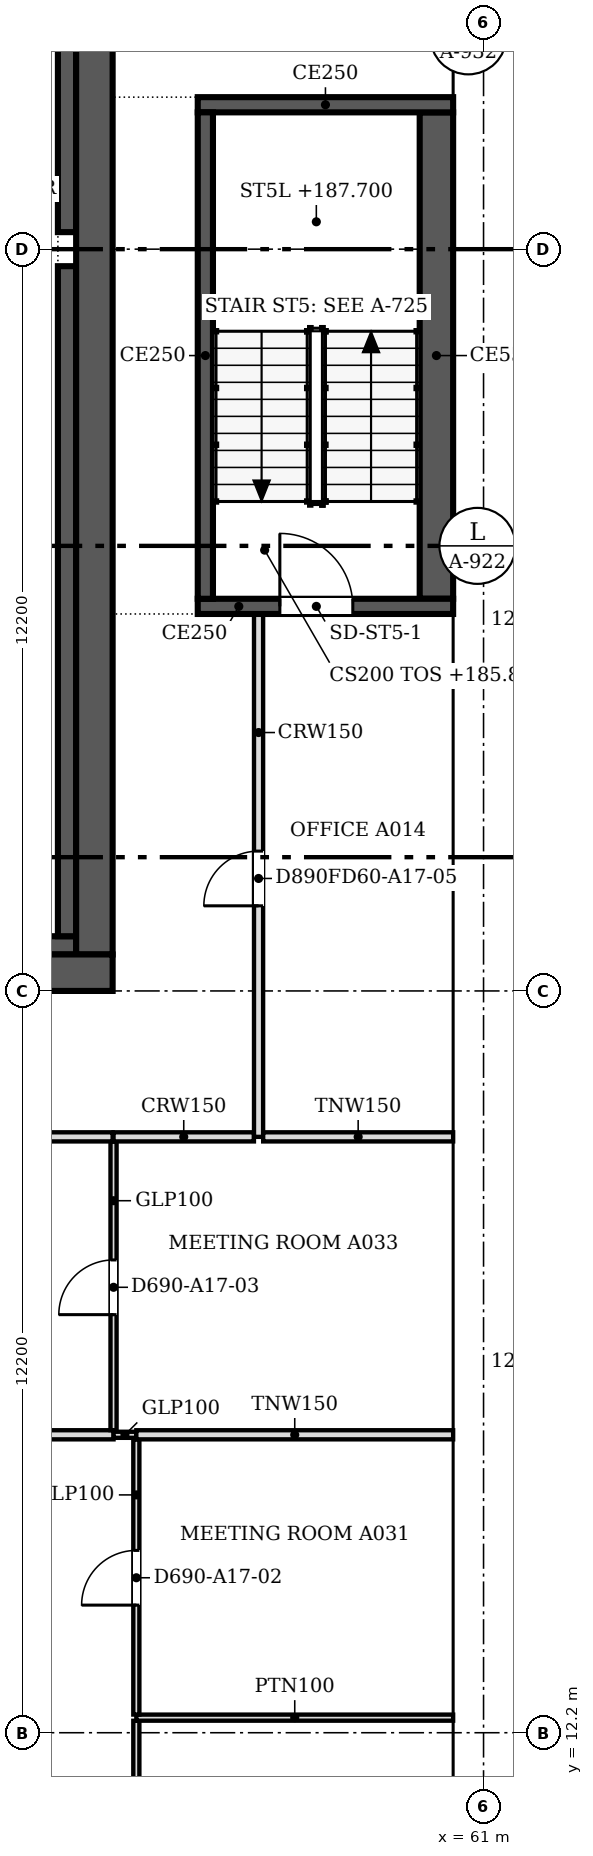
"""IFC4 building model, lengths in metres.
Left out: names, types, materials, properties, quantities, classifications, styles, units other than length and angle.
Written with IfcOpenShell. Run it as: python <this file> out.ifc"""

import sys

from ifc_helpers import new_model, si_unit, direction, frame, frame_2d, origin, place, context, subcontext, project, spatial, polyline, rectangle, outline, extrude, faceted_brep, source, transform, mapped, element, fill, save


model = new_model("IFC4")
c1 = context("Model", 3, precision=1e-05, world=origin(), true_north=direction((0.0, 1.0)))
c2 = subcontext(c1, "Body", "Model", "MODEL_VIEW")
j1 = project(units=[si_unit("LENGTHUNIT", "METRE"), si_unit("PLANEANGLEUNIT", "RADIAN")], contexts=[c1])
p1 = place(None, origin())
s1 = spatial("IfcSite", under=j1, at=p1, CompositionType="ELEMENT")
p2 = place(p1, origin())
s2 = spatial("IfcBuilding", under=s1, at=p2, CompositionType="ELEMENT")
p3 = place(p2, frame((0.0, 0.0, 185.8)))
s3 = spatial("IfcBuildingStorey", under=s2, at=p3, CompositionType="ELEMENT", Elevation=185.8)
m1 = source(origin(), c2, "Body", "Brep", [
    faceted_brep([(3.003, -0.25, 0.0), (6.053, -0.25, 3.8), (3.003, -0.25, 7.6), (0.0, -0.25, 3.8), (0.047, 0.25, 3.859), (3.003, 0.25, 7.6), (6.053, 0.25, 3.8), (3.003, 0.25, 0.0), (0.047, 0.25, 3.741), (0.0, 0.0, 3.8)], [[[0, 1, 2, 3]], [[4, 5, 6, 7, 8]], [[7, 6, 1, 0]], [[6, 5, 2, 1]], [[5, 4, 9, 3, 2]], [[8, 7, 0, 3, 9]], [[8, 9, 4]]]),
])
p4 = place(p3, frame((60.75, 6.146, -3.8), z_axis=(0.0, 0.0, 1.0), x_axis=(0.0, 1.0, 0.0)))
e1 = element("IfcWall", 1, at=p4, inside=s3, PredefinedType="SOLIDWALL", context=c2, shape_type="MappedRepresentation", body=[
    mapped(m1, transform((0.0, 0.0, 0.0), scale=1.0)),
])
m2 = source(origin(), c2, "Body", "SweptSolid", [
    extrude(outline(polyline([(3.005, 0.401), (5.733, 3.8), (3.005, 7.199), (0.319, 3.8), (3.005, 0.401)])), frame((0.0, 0.26, 0.0), z_axis=(0.0, -1.0, 0.0), x_axis=(1.0, 0.0, 0.0)), (0.0, 0.0, 1.0), 0.52),
])
p5 = place(p4, origin())
e2 = element("IfcOpeningElement", 2, at=p5, cuts=e1, PredefinedType="OPENING", context=c2, shape_type="MappedRepresentation", body=[
    mapped(m2, transform((0.0, 0.0, 0.0), scale=1.0)),
])
m3 = source(origin(), c2, "Body", "SweptSolid", [
    extrude(outline(polyline([(3.05, 0.0), (6.1, 3.8), (3.05, 7.6), (0.0, 3.8), (3.05, 0.0)])), frame((0.0, 0.25, 0.0), z_axis=(0.0, -1.0, 0.0), x_axis=(1.0, 0.0, 0.0)), (0.0, 0.0, 1.0), 0.5),
])
p6 = place(p3, frame((60.75, 12.2, -3.8), z_axis=(0.0, 0.0, 1.0), x_axis=(0.0, 1.0, 0.0)))
e3 = element("IfcWall", 3, at=p6, inside=s3, PredefinedType="SOLIDWALL", context=c2, shape_type="MappedRepresentation", body=[
    mapped(m3, transform((0.0, 0.0, 0.0), scale=1.0)),
])
m4 = source(origin(), c2, "Body", "SweptSolid", [
    extrude(outline(polyline([(3.05, 0.399), (5.78, 3.8), (3.05, 7.201), (0.321, 3.8), (3.05, 0.399)])), frame((0.0, 0.26, 0.0), z_axis=(0.0, -1.0, 0.0), x_axis=(1.0, 0.0, 0.0)), (0.0, 0.0, 1.0), 0.52),
])
p7 = place(p6, origin())
e4 = element("IfcOpeningElement", 4, at=p7, cuts=e3, PredefinedType="OPENING", context=c2, shape_type="MappedRepresentation", body=[
    mapped(m4, transform((0.0, 0.0, 0.0), scale=1.0)),
])
m5 = source(origin(), c2, "Body", "Brep", [
    faceted_brep([(3.05, -0.25, 0.0), (6.1, -0.25, 3.8), (6.1, -0.25, 3.8), (3.05, -0.25, 7.6), (0.0, -0.25, 3.8), (0.0, 0.25, 3.8), (3.05, 0.25, 7.6), (6.1, 0.25, 3.8), (6.1, 0.25, 3.8), (3.05, 0.25, 0.0)], [[[0, 1, 2, 3, 4]], [[5, 6, 7, 8, 9]], [[9, 8, 1, 0]], [[7, 6, 3, 2]], [[6, 5, 4, 3]], [[5, 9, 0, 4]], [[1, 8, 7, 2]]]),
])
p8 = place(p3, frame((60.75, 18.3, -3.8), z_axis=(0.0, 0.0, 1.0), x_axis=(0.0, 1.0, 0.0)))
e5 = element("IfcWall", 5, at=p8, inside=s3, PredefinedType="SOLIDWALL", context=c2, shape_type="MappedRepresentation", body=[
    mapped(m5, transform((0.0, 0.0, 0.0), scale=1.0)),
])
p9 = place(p8, origin())
e6 = element("IfcOpeningElement", 6, at=p9, cuts=e5, PredefinedType="OPENING", context=c2, shape_type="MappedRepresentation", body=[
    mapped(m4, transform((0.0, 0.0, 0.0), scale=1.0)),
])
p10 = place(p3, frame((60.75, 24.4, -3.8), z_axis=(0.0, 0.0, 1.0), x_axis=(0.0, 1.0, 0.0)))
e7 = element("IfcWall", 7, at=p10, inside=s3, PredefinedType="SOLIDWALL", context=c2, shape_type="MappedRepresentation", body=[
    mapped(m3, transform((0.0, 0.0, 0.0), scale=1.0)),
])
p11 = place(p10, origin())
e8 = element("IfcOpeningElement", 8, at=p11, cuts=e7, PredefinedType="OPENING", context=c2, shape_type="MappedRepresentation", body=[
    mapped(m4, transform((0.0, 0.0, 0.0), scale=1.0)),
])
p12 = place(p3, frame((60.75, 30.5, -3.8), z_axis=(0.0, 0.0, 1.0), x_axis=(0.0, 1.0, 0.0)))
e9 = element("IfcWall", 9, at=p12, inside=s3, PredefinedType="SOLIDWALL", context=c2, shape_type="MappedRepresentation", body=[
    mapped(m3, transform((0.0, 0.0, 0.0), scale=1.0)),
])
p13 = place(p12, origin())
e10 = element("IfcOpeningElement", 10, at=p13, cuts=e9, PredefinedType="OPENING", context=c2, shape_type="MappedRepresentation", body=[
    mapped(m4, transform((0.0, 0.0, 0.0), scale=1.0)),
])
p14 = place(p3, frame((60.75, 36.6, -3.8), z_axis=(0.0, 0.0, 1.0), x_axis=(0.0, 1.0, 0.0)))
e11 = element("IfcWall", 11, at=p14, inside=s3, PredefinedType="SOLIDWALL", context=c2, shape_type="MappedRepresentation", body=[
    mapped(m5, transform((0.0, 0.0, 0.0), scale=1.0)),
])
p15 = place(p14, origin())
e12 = element("IfcOpeningElement", 12, at=p15, cuts=e11, PredefinedType="OPENING", context=c2, shape_type="MappedRepresentation", body=[
    mapped(m4, transform((0.0, 0.0, 0.0), scale=1.0)),
])
p16 = place(p2, frame((0.0, 0.0, 189.6)))
s4 = spatial("IfcBuildingStorey", under=s2, at=p16, CompositionType="ELEMENT", Elevation=189.6)
m6 = source(origin(), c2, "Body", "SweptSolid", [
    extrude(outline(polyline([(3.05, 0.0), (6.1, 3.8), (3.05, 7.6), (0.0, 3.8), (3.05, 0.0)])), frame((0.0, 0.25, 0.0), z_axis=(0.0, -1.0, 0.0), x_axis=(1.0, 0.0, 0.0)), (0.0, 0.0, 1.0), 0.5),
])
p17 = place(p16, frame((60.75, 9.15, -3.8), z_axis=(0.0, 0.0, 1.0), x_axis=(0.0, 1.0, 0.0)))
e13 = element("IfcWall", 13, at=p17, inside=s4, PredefinedType="SOLIDWALL", context=c2, shape_type="MappedRepresentation", body=[
    mapped(m6, transform((0.0, 0.0, 0.0), scale=1.0)),
])
m7 = source(origin(), c2, "Body", "SweptSolid", [
    extrude(outline(polyline([(3.05, 0.399), (5.78, 3.8), (3.05, 7.2), (0.321, 3.8), (3.05, 0.399)])), frame((0.0, 0.26, 0.0), z_axis=(0.0, -1.0, 0.0), x_axis=(1.0, 0.0, 0.0)), (0.0, 0.0, 1.0), 0.52),
])
p18 = place(p17, origin())
e14 = element("IfcOpeningElement", 14, at=p18, cuts=e13, PredefinedType="OPENING", context=c2, shape_type="MappedRepresentation", body=[
    mapped(m7, transform((0.0, 0.0, 0.0), scale=1.0)),
])
p19 = place(p16, frame((60.75, 15.25, -3.8), z_axis=(0.0, 0.0, 1.0), x_axis=(0.0, 1.0, 0.0)))
e15 = element("IfcWall", 15, at=p19, inside=s4, PredefinedType="SOLIDWALL", context=c2, shape_type="MappedRepresentation", body=[
    mapped(m6, transform((0.0, 0.0, 0.0), scale=1.0)),
])
p20 = place(p19, origin())
e16 = element("IfcOpeningElement", 16, at=p20, cuts=e15, PredefinedType="OPENING", context=c2, shape_type="MappedRepresentation", body=[
    mapped(m7, transform((0.0, 0.0, 0.0), scale=1.0)),
])
m8 = source(origin(), c2, "Body", "Brep", [
    faceted_brep([(3.05, -0.25, 0.0), (6.1, -0.25, 3.8), (6.1, -0.25, 3.8), (3.05, -0.25, 7.6), (0.0, -0.25, 3.8), (0.0, 0.25, 3.8), (3.05, 0.25, 7.6), (6.1, 0.25, 3.8), (6.1, 0.25, 3.8), (3.05, 0.25, 0.0)], [[[0, 1, 2, 3, 4]], [[5, 6, 7, 8, 9]], [[9, 8, 1, 0]], [[7, 6, 3, 2]], [[6, 5, 4, 3]], [[5, 9, 0, 4]], [[1, 8, 7, 2]]]),
])
p21 = place(p16, frame((60.75, 21.35, -3.8), z_axis=(0.0, 0.0, 1.0), x_axis=(0.0, 1.0, 0.0)))
e17 = element("IfcWall", 17, at=p21, inside=s4, PredefinedType="SOLIDWALL", context=c2, shape_type="MappedRepresentation", body=[
    mapped(m8, transform((0.0, 0.0, 0.0), scale=1.0)),
])
p22 = place(p21, origin())
e18 = element("IfcOpeningElement", 18, at=p22, cuts=e17, PredefinedType="OPENING", context=c2, shape_type="MappedRepresentation", body=[
    mapped(m7, transform((0.0, 0.0, 0.0), scale=1.0)),
])
p23 = place(p16, frame((60.75, 27.45, -3.8), z_axis=(0.0, 0.0, 1.0), x_axis=(0.0, 1.0, 0.0)))
e19 = element("IfcWall", 19, at=p23, inside=s4, PredefinedType="SOLIDWALL", context=c2, shape_type="MappedRepresentation", body=[
    mapped(m6, transform((0.0, 0.0, 0.0), scale=1.0)),
])
p24 = place(p23, origin())
e20 = element("IfcOpeningElement", 20, at=p24, cuts=e19, PredefinedType="OPENING", context=c2, shape_type="MappedRepresentation", body=[
    mapped(m7, transform((0.0, 0.0, 0.0), scale=1.0)),
])
p25 = place(p16, frame((60.75, 33.55, -3.8), z_axis=(0.0, 0.0, 1.0), x_axis=(0.0, 1.0, 0.0)))
e21 = element("IfcWall", 21, at=p25, inside=s4, PredefinedType="SOLIDWALL", context=c2, shape_type="MappedRepresentation", body=[
    mapped(m8, transform((0.0, 0.0, 0.0), scale=1.0)),
])
p26 = place(p25, origin())
e22 = element("IfcOpeningElement", 22, at=p26, cuts=e21, PredefinedType="OPENING", context=c2, shape_type="MappedRepresentation", body=[
    mapped(m7, transform((0.0, 0.0, 0.0), scale=1.0)),
])
p27 = place(p16, frame((60.75, 39.65, -3.8), z_axis=(0.0, 0.0, 1.0), x_axis=(0.0, 1.0, 0.0)))
e23 = element("IfcWall", 23, at=p27, inside=s4, PredefinedType="SOLIDWALL", context=c2, shape_type="MappedRepresentation", body=[
    mapped(m6, transform((0.0, 0.0, 0.0), scale=1.0)),
])
p28 = place(p27, origin())
e24 = element("IfcOpeningElement", 24, at=p28, cuts=e23, PredefinedType="OPENING", context=c2, shape_type="MappedRepresentation", body=[
    mapped(m7, transform((0.0, 0.0, 0.0), scale=1.0)),
])
p29 = place(p3, frame((54.9, 24.7, 0.0), z_axis=(0.0, 0.0, 1.0), x_axis=(-1.0, 0.0, 0.0)))
e25 = element("IfcWall", 25, at=p29, inside=s3, PredefinedType="SHEAR", context=c2, shape_type="SweptSolid", body=[
    extrude(rectangle(XDim=24.4, YDim=0.6, at=frame_2d((12.2, 0.0))), origin(), (0.0, 0.0, 1.0), 3.8),
])
m9 = source(origin(), c2, "Body", "SweptSolid", [
    extrude(rectangle(XDim=1.2, YDim=2.1, at=frame_2d((0.6, 1.05))), frame((0.0, 0.31, 0.0), z_axis=(0.0, -1.0, 0.0), x_axis=(1.0, 0.0, 0.0)), (0.0, 0.0, 1.0), 0.62),
])
p30 = place(p29, frame((1.5, 0.0, 0.0)))
e26 = element("IfcOpeningElement", 26, at=p30, cuts=e25, PredefinedType="OPENING", context=c2, shape_type="MappedRepresentation", body=[
    mapped(m9, transform((0.0, 0.0, 0.0), scale=1.0)),
])
p31 = place(p3, frame((54.6, 48.2, 0.0), z_axis=(0.0, 0.0, 1.0), x_axis=(0.0, -1.0, 0.0)))
e27 = element("IfcWall", 27, at=p31, inside=s3, PredefinedType="SHEAR", context=c2, shape_type="SweptSolid", body=[
    extrude(rectangle(XDim=23.2, YDim=0.6, at=frame_2d((11.6, 0.0))), origin(), (0.0, 0.0, 1.0), 3.8),
])
p32 = place(p31, frame((4.9, 0.0, 0.0)))
e28 = element("IfcOpeningElement", 28, at=p32, cuts=e27, PredefinedType="OPENING", context=c2, shape_type="MappedRepresentation", body=[
    mapped(m9, transform((0.0, 0.0, 0.0), scale=1.0)),
])
p33 = place(p3, frame((53.4, 25.15, 0.0), z_axis=(0.0, 0.0, 1.0), x_axis=(1.0, 0.0, 0.0)))
e29 = element("IfcWall", 29, at=p33, inside=s3, PredefinedType="SOLIDWALL", context=c2, shape_type="SweptSolid", body=[
    extrude(rectangle(XDim=0.9, YDim=0.3, at=frame_2d((0.45, 0.0))), origin(), (0.0, 0.0, 1.0), 3.8),
])
p34 = place(p3, frame((54.15, 25.3, 0.0), z_axis=(0.0, 0.0, 1.0), x_axis=(0.0, 1.0, 0.0)))
e30 = element("IfcWall", 30, at=p34, inside=s3, PredefinedType="SOLIDWALL", context=c2, shape_type="SweptSolid", body=[
    extrude(rectangle(XDim=11.02, YDim=0.3, at=frame_2d((5.51, 0.0))), origin(), (0.0, 0.0, 1.0), 3.8),
])
p35 = place(p3, frame((54.15, 36.88, 0.0), z_axis=(0.0, 0.0, 1.0), x_axis=(0.0, 1.0, 0.0)))
e31 = element("IfcWall", 31, at=p35, inside=s3, PredefinedType="SOLIDWALL", context=c2, shape_type="SweptSolid", body=[
    extrude(rectangle(XDim=5.22, YDim=0.3, at=frame_2d((2.61, 0.0))), origin(), (0.0, 0.0, 1.0), 3.8),
])
p36 = place(p3, frame((60.5, 30.725, 0.0), z_axis=(0.0, 0.0, 1.0), x_axis=(-1.0, 0.0, 0.0)))
e32 = element("IfcWall", 32, at=p36, inside=s3, PredefinedType="SOLIDWALL", context=c2, shape_type="SweptSolid", body=[
    extrude(rectangle(XDim=4.2, YDim=0.25, at=frame_2d((2.1, 0.0))), origin(), (0.0, 0.0, 1.0), 3.8),
])
m10 = source(origin(), c2, "Body", "SweptSolid", [
    extrude(rectangle(XDim=1.2, YDim=2.1, at=frame_2d((0.6, 1.05))), frame((0.0, 0.135, 0.0), z_axis=(0.0, -1.0, 0.0), x_axis=(1.0, 0.0, 0.0)), (0.0, 0.0, 1.0), 0.27),
])
p37 = place(p36, frame((1.65, 0.0, 0.0)))
e33 = element("IfcOpeningElement", 33, at=p37, cuts=e32, PredefinedType="OPENING", context=c2, shape_type="MappedRepresentation", body=[
    mapped(m10, transform((0.0, 0.0, 0.0), scale=1.0)),
])
p38 = place(p3, frame((56.425, 30.85, 0.0), z_axis=(0.0, 0.0, 1.0), x_axis=(0.0, 1.0, 0.0)))
e34 = element("IfcWall", 34, at=p38, inside=s3, PredefinedType="SOLIDWALL", context=c2, shape_type="SweptSolid", body=[
    extrude(rectangle(XDim=8.0, YDim=0.25, at=frame_2d((4.0, 0.0))), origin(), (0.0, 0.0, 1.0), 3.8),
])
p39 = place(p3, frame((56.3, 38.975, 0.0), z_axis=(0.0, 0.0, 1.0), x_axis=(1.0, 0.0, 0.0)))
e35 = element("IfcWall", 35, at=p39, inside=s3, PredefinedType="SOLIDWALL", context=c2, shape_type="SweptSolid", body=[
    extrude(rectangle(XDim=4.2, YDim=0.25, at=frame_2d((2.1, 0.0))), origin(), (0.0, 0.0, 1.0), 3.8),
])
p40 = place(p3, frame((60.225, 38.85, 0.0), z_axis=(0.0, 0.0, 1.0), x_axis=(0.0, -1.0, 0.0)))
e36 = element("IfcWall", 36, at=p40, inside=s3, PredefinedType="SOLIDWALL", context=c2, shape_type="SweptSolid", body=[
    extrude(rectangle(XDim=8.0, YDim=0.55, at=frame_2d((4.0, 0.0))), origin(), (0.0, 0.0, 1.0), 3.8),
])
p41 = place(p3, frame((55.29, 12.397, 0.0), z_axis=(0.0, 0.0, 1.0), x_axis=(0.0, -1.0, 0.0)))
e37 = element("IfcWall", 37, at=p41, inside=s3, PredefinedType="PARTITIONING", context=c2, shape_type="SweptSolid", body=[
    extrude(rectangle(XDim=4.297, YDim=0.1, at=frame_2d((2.148, 0.0))), origin(), (0.0, 0.0, 1.0), 3.067),
])
m11 = source(origin(), c2, "Body", "SweptSolid", [
    extrude(rectangle(XDim=0.9, YDim=2.1, at=frame_2d((0.45, 1.05))), frame((0.0, 0.06, 0.0), z_axis=(0.0, -1.0, 0.0), x_axis=(1.0, 0.0, 0.0)), (0.0, 0.0, 1.0), 0.12),
])
p42 = place(p41, frame((1.697, 0.0, 0.0)))
e38 = element("IfcOpeningElement", 38, at=p42, cuts=e37, PredefinedType="OPENING", context=c2, shape_type="MappedRepresentation", body=[
    mapped(m11, transform((0.0, 0.0, 0.0), scale=1.0)),
])
p43 = place(p3, frame((55.29, 12.448, 0.0), z_axis=(0.0, 0.0, 1.0), x_axis=(1.0, 0.0, 0.0)))
e39 = element("IfcWall", 39, at=p43, inside=s3, PredefinedType="PARTITIONING", context=c2, shape_type="SweptSolid", body=[
    extrude(rectangle(XDim=5.21, YDim=0.1, at=frame_2d((2.605, 0.0))), origin(), (0.0, 0.0, 1.0), 3.067),
])
p44 = place(p3, frame((55.29, 17.024, 0.0), z_axis=(0.0, 0.0, 1.0), x_axis=(0.0, -1.0, 0.0)))
e40 = element("IfcWall", 40, at=p44, inside=s3, PredefinedType="PARTITIONING", context=c2, shape_type="SweptSolid", body=[
    extrude(rectangle(XDim=4.525, YDim=0.1, at=frame_2d((2.263, 0.0))), origin(), (0.0, 0.0, 1.0), 3.067),
])
p45 = place(p44, frame((1.825, 0.0, 0.0)))
e41 = element("IfcOpeningElement", 41, at=p45, cuts=e40, PredefinedType="OPENING", context=c2, shape_type="MappedRepresentation", body=[
    mapped(m11, transform((0.0, 0.0, 0.0), scale=1.0)),
])
p46 = place(p3, frame((45.476, 17.1, 0.0), z_axis=(0.0, 0.0, 1.0), x_axis=(1.0, 0.0, 0.0)))
e42 = element("IfcWall", 42, at=p46, inside=s3, PredefinedType="PARTITIONING", context=c2, shape_type="SweptSolid", body=[
    extrude(rectangle(XDim=9.439, YDim=0.15, at=frame_2d((4.719, 0.0))), origin(), (0.0, 0.0, 1.0), 3.067),
])
p47 = place(p3, frame((54.916, 17.1, 0.0), z_axis=(0.0, 0.0, 1.0), x_axis=(1.0, 0.0, 0.0)))
e43 = element("IfcWall", 43, at=p47, inside=s3, PredefinedType="PARTITIONING", context=c2, shape_type="SweptSolid", body=[
    extrude(rectangle(XDim=0.373, YDim=0.1, at=frame_2d((0.187, 0.0))), origin(), (0.0, 0.0, 1.0), 3.067),
])
p48 = place(p3, frame((55.29, 17.1, 0.0), z_axis=(0.0, 0.0, 1.0), x_axis=(1.0, 0.0, 0.0)))
e44 = element("IfcWall", 44, at=p48, inside=s3, PredefinedType="PARTITIONING", context=c2, shape_type="SweptSolid", body=[
    extrude(rectangle(XDim=5.21, YDim=0.15, at=frame_2d((2.605, 0.0))), origin(), (0.0, 0.0, 1.0), 3.067),
])
p49 = place(p3, frame((54.915, 21.924, 0.0), z_axis=(0.0, 0.0, 1.0), x_axis=(0.0, -1.0, 0.0)))
e45 = element("IfcWall", 45, at=p49, inside=s3, PredefinedType="PARTITIONING", context=c2, shape_type="SweptSolid", body=[
    extrude(rectangle(XDim=4.748, YDim=0.1, at=frame_2d((2.374, 0.0))), origin(), (0.0, 0.0, 1.0), 3.067),
])
p50 = place(p49, frame((1.948, 0.0, 0.0)))
e46 = element("IfcOpeningElement", 46, at=p50, cuts=e45, PredefinedType="OPENING", context=c2, shape_type="MappedRepresentation", body=[
    mapped(m11, transform((0.0, 0.0, 0.0), scale=1.0)),
])
p51 = place(p3, frame((45.4, 22.0, 0.0), z_axis=(0.0, 0.0, 1.0), x_axis=(1.0, 0.0, 0.0)))
e47 = element("IfcWall", 47, at=p51, inside=s3, PredefinedType="PARTITIONING", context=c2, shape_type="SweptSolid", body=[
    extrude(rectangle(XDim=9.5, YDim=0.15, at=frame_2d((4.75, 0.0))), origin(), (0.0, 0.0, 1.0), 3.067),
])
p52 = place(p3, frame((54.915, 22.0, 0.0), z_axis=(0.0, 0.0, 1.0), x_axis=(1.0, 0.0, 0.0)))
e48 = element("IfcWall", 48, at=p52, inside=s3, PredefinedType="PARTITIONING", context=c2, shape_type="SweptSolid", body=[
    extrude(rectangle(XDim=2.309, YDim=0.15, at=frame_2d((1.155, 0.0))), origin(), (0.0, 0.0, 1.0), 3.067),
])
p53 = place(p3, frame((57.3, 30.6, 0.0), z_axis=(0.0, 0.0, 1.0), x_axis=(0.0, -1.0, 0.0)))
e49 = element("IfcWall", 49, at=p53, inside=s3, PredefinedType="PARTITIONING", context=c2, shape_type="SweptSolid", body=[
    extrude(rectangle(XDim=8.6, YDim=0.15, at=frame_2d((4.3, 0.0))), origin(), (0.0, 0.0, 1.0), 3.067),
])
m12 = source(origin(), c2, "Body", "SweptSolid", [
    extrude(rectangle(XDim=0.9, YDim=2.1, at=frame_2d((0.45, 1.05))), frame((0.0, 0.085, 0.0), z_axis=(0.0, -1.0, 0.0), x_axis=(1.0, 0.0, 0.0)), (0.0, 0.0, 1.0), 0.17),
])
p54 = place(p53, frame((3.9, 0.0, 0.0)))
e50 = element("IfcOpeningElement", 50, at=p54, cuts=e49, PredefinedType="OPENING", context=c2, shape_type="MappedRepresentation", body=[
    mapped(m12, transform((0.0, 0.0, 0.0), scale=1.0)),
])
p55 = place(p3, frame((57.376, 22.0, 0.0), z_axis=(0.0, 0.0, 1.0), x_axis=(1.0, 0.0, 0.0)))
e51 = element("IfcWall", 51, at=p55, inside=s3, PredefinedType="PARTITIONING", context=c2, shape_type="SweptSolid", body=[
    extrude(rectangle(XDim=3.124, YDim=0.15, at=frame_2d((1.562, 0.0))), origin(), (0.0, 0.0, 1.0), 3.067),
])
m13 = source(origin(), c2, "Body", "SweptSolid", [
    extrude(rectangle(XDim=1.2, YDim=2.1, at=frame_2d((0.6, 1.05))), frame((0.0, 0.025, 0.0), z_axis=(0.0, -1.0, 0.0), x_axis=(1.0, 0.0, 0.0)), (0.0, 0.0, 1.0), 0.05),
])
p56 = place(p37, origin())
e52 = element("IfcDoor", 52, at=p56, inside=s3, OperationType="SINGLE_SWING_RIGHT", PredefinedType="DOOR", context=c2, shape_type="MappedRepresentation", body=[
    mapped(m13, transform((0.0, 0.0, 0.0), scale=1.0)),
])
fill(e33, e52)
m14 = source(origin(), c2, "Body", "SweptSolid", [
    extrude(rectangle(XDim=0.9, YDim=2.1, at=frame_2d((0.45, 1.05))), frame((0.0, 0.025, 0.0), z_axis=(0.0, -1.0, 0.0), x_axis=(1.0, 0.0, 0.0)), (0.0, 0.0, 1.0), 0.05),
])
p57 = place(p45, origin())
e53 = element("IfcDoor", 53, at=p57, inside=s3, OperationType="SINGLE_SWING_RIGHT", PredefinedType="DOOR", context=c2, shape_type="MappedRepresentation", body=[
    mapped(m14, transform((0.0, 0.0, 0.0), scale=1.0)),
])
fill(e41, e53)
p58 = place(p50, origin())
e54 = element("IfcDoor", 54, at=p58, inside=s3, OperationType="SINGLE_SWING_RIGHT", PredefinedType="DOOR", context=c2, shape_type="MappedRepresentation", body=[
    mapped(m14, transform((0.0, 0.0, 0.0), scale=1.0)),
])
fill(e46, e54)
p59 = place(p54, origin())
e55 = element("IfcDoor", 55, at=p59, inside=s3, OperationType="SINGLE_SWING_RIGHT", PredefinedType="DOOR", context=c2, shape_type="MappedRepresentation", body=[
    mapped(m14, transform((0.0, 0.0, 0.0), scale=1.0)),
])
fill(e50, e55)
save(model, sys.argv[1])
